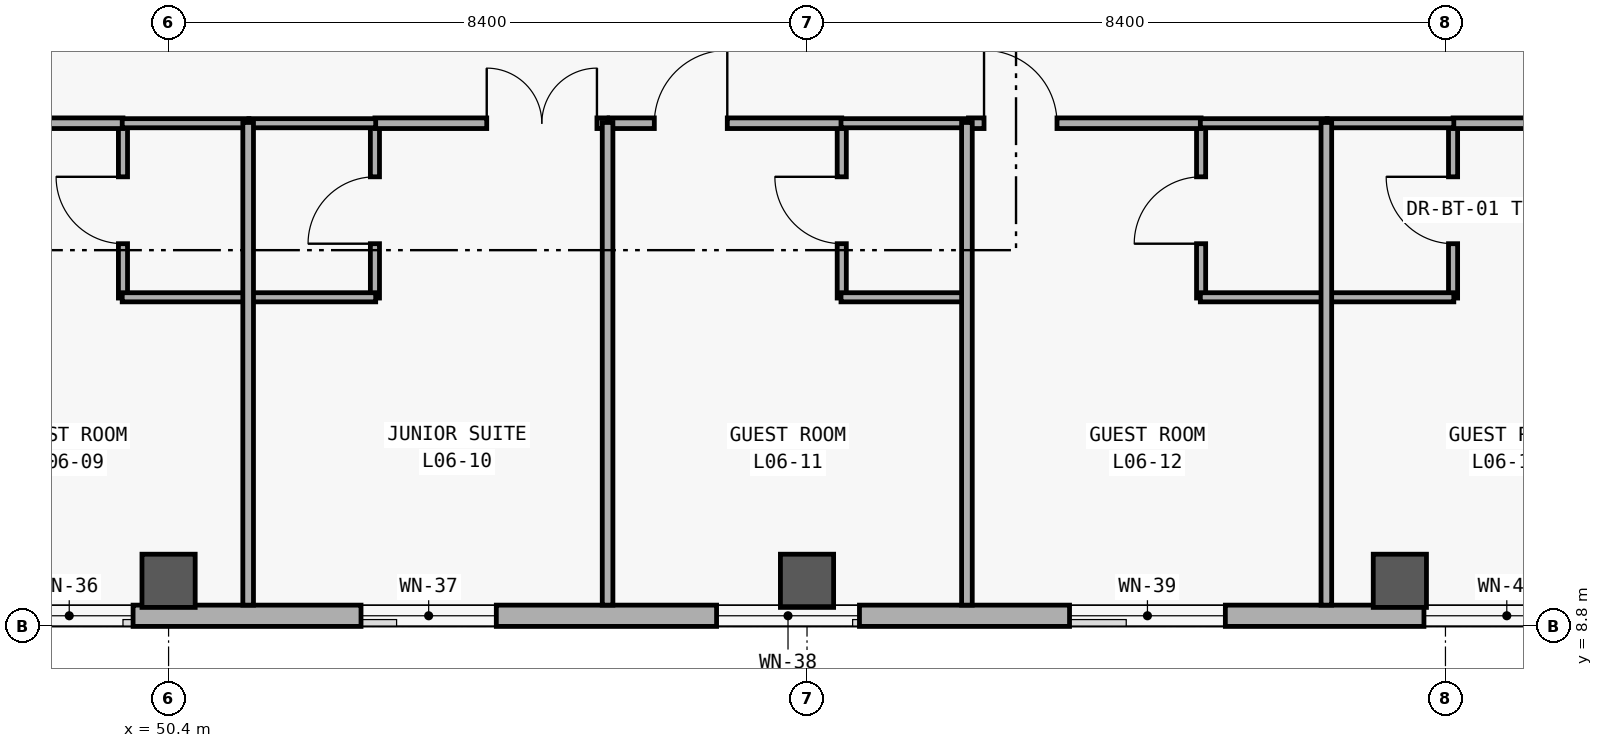
"""IFC4 building model, lengths in metres.
Left out: names, types, materials, properties, quantities, classifications, styles, units other than length and angle.
Written with IfcOpenShell. Run it as: python <this file> out.ifc"""

import sys

from ifc_helpers import new_model, si_unit, direction, frame, frame_2d, origin, origin_2d, place, context, subcontext, project, spatial, rectangle, extrude, element, fill, save


model = new_model("IFC4")
c1 = context("Model", 3, precision=1e-05, world=origin(), true_north=direction((0.0, 1.0)))
c2 = subcontext(c1, "Body", "Model", "MODEL_VIEW")
j1 = project(units=[si_unit("LENGTHUNIT", "METRE"), si_unit("PLANEANGLEUNIT", "RADIAN")], contexts=[c1])
p1 = place(None, origin())
s1 = spatial("IfcSite", under=j1, at=p1, CompositionType="ELEMENT")
p2 = place(p1, origin())
s2 = spatial("IfcBuilding", under=s1, at=p2, CompositionType="ELEMENT")
p3 = place(p2, frame((0.0, 0.0, 26.4)))
s3 = spatial("IfcBuildingStorey", under=s2, at=p3, CompositionType="ELEMENT", Elevation=26.4)
for number, where, z_axis, x_axis in (
    (1, (50.4, 9.4, 0.0), (0.0, 0.0, 1.0), (1.0, 0.0, 0.0)),
    (2, (58.8, 9.4, 0.0), (0.0, 0.0, 1.0), (1.0, 0.0, 0.0)),
    (3, (66.6, 9.4, 0.0), (0.0, 0.0, 1.0), (1.0, 0.0, 0.0)),
):
    element("IfcColumn", number, at=place(p3, frame(where, z_axis=z_axis, x_axis=x_axis)), inside=s3, PredefinedType="COLUMN", context=c2, shape_type="SweptSolid", body=[
        extrude(rectangle(XDim=0.7, YDim=0.7, at=origin_2d()), origin(), (0.0, 0.0, 1.0), 3.6),
    ])
p4 = place(p3, frame((75.32, 8.94, 0.0), z_axis=(0.0, 0.0, 1.0), x_axis=(-1.0, 0.0, 0.0)))
e4 = element("IfcWall", 4, at=p4, inside=s3, PredefinedType="SOLIDWALL", context=c2, shape_type="SweptSolid", body=[
    extrude(rectangle(XDim=66.64, YDim=0.28, at=frame_2d((33.32, 0.0))), origin(), (0.0, 0.0, 1.0), 3.32),
])
p5 = place(p4, frame((62.905, 0.0, 0.85)))
e5 = element("IfcOpeningElement", 5, at=p5, cuts=e4, PredefinedType="OPENING", context=c2, shape_type="SweptSolid", body=[
    extrude(rectangle(XDim=2.3, YDim=2.05, at=frame_2d((1.15, 1.025))), frame((0.0, 0.15, 0.0), z_axis=(0.0, -1.0, 0.0), x_axis=(1.0, 0.0, 0.0)), (0.0, 0.0, 1.0), 0.3),
])
p6 = place(p4, frame((57.952, 0.0, 0.85)))
e6 = element("IfcOpeningElement", 6, at=p6, cuts=e4, PredefinedType="OPENING", context=c2, shape_type="SweptSolid", body=[
    extrude(rectangle(XDim=2.75, YDim=2.1, at=frame_2d((1.375, 1.05))), frame((0.0, 0.15, 0.0), z_axis=(0.0, -1.0, 0.0), x_axis=(1.0, 0.0, 0.0)), (0.0, 0.0, 1.0), 0.3),
])
p7 = place(p4, frame((52.948, 0.0, 0.85)))
e7 = element("IfcOpeningElement", 7, at=p7, cuts=e4, PredefinedType="OPENING", context=c2, shape_type="SweptSolid", body=[
    extrude(rectangle(XDim=3.3, YDim=2.15, at=frame_2d((1.65, 1.075))), frame((0.0, 0.15, 0.0), z_axis=(0.0, -1.0, 0.0), x_axis=(1.0, 0.0, 0.0)), (0.0, 0.0, 1.0), 0.3),
])
p8 = place(p4, frame((49.28, 0.0, 0.85)))
e8 = element("IfcOpeningElement", 8, at=p8, cuts=e4, PredefinedType="OPENING", context=c2, shape_type="SweptSolid", body=[
    extrude(rectangle(XDim=1.18, YDim=1.5, at=frame_2d((0.59, 0.75))), frame((0.0, 0.15, 0.0), z_axis=(0.0, -1.0, 0.0), x_axis=(1.0, 0.0, 0.0)), (0.0, 0.0, 1.0), 0.3),
])
p9 = place(p4, frame((44.501, 0.0, 0.85)))
e9 = element("IfcOpeningElement", 9, at=p9, cuts=e4, PredefinedType="OPENING", context=c2, shape_type="SweptSolid", body=[
    extrude(rectangle(XDim=1.28, YDim=1.6, at=frame_2d((0.64, 0.8))), frame((0.0, 0.15, 0.0), z_axis=(0.0, -1.0, 0.0), x_axis=(1.0, 0.0, 0.0)), (0.0, 0.0, 1.0), 0.3),
])
p10 = place(p4, frame((39.723, 0.0, 0.85)))
e10 = element("IfcOpeningElement", 10, at=p10, cuts=e4, PredefinedType="OPENING", context=c2, shape_type="SweptSolid", body=[
    extrude(rectangle(XDim=1.38, YDim=1.7, at=frame_2d((0.69, 0.85))), frame((0.0, 0.15, 0.0), z_axis=(0.0, -1.0, 0.0), x_axis=(1.0, 0.0, 0.0)), (0.0, 0.0, 1.0), 0.3),
])
p11 = place(p4, frame((34.944, 0.0, 0.85)))
e11 = element("IfcOpeningElement", 11, at=p11, cuts=e4, PredefinedType="OPENING", context=c2, shape_type="SweptSolid", body=[
    extrude(rectangle(XDim=1.48, YDim=1.8, at=frame_2d((0.74, 0.9))), frame((0.0, 0.15, 0.0), z_axis=(0.0, -1.0, 0.0), x_axis=(1.0, 0.0, 0.0)), (0.0, 0.0, 1.0), 0.3),
])
p12 = place(p4, frame((30.165, 0.0, 0.85)))
e12 = element("IfcOpeningElement", 12, at=p12, cuts=e4, PredefinedType="OPENING", context=c2, shape_type="SweptSolid", body=[
    extrude(rectangle(XDim=1.58, YDim=1.85, at=frame_2d((0.79, 0.925))), frame((0.0, 0.15, 0.0), z_axis=(0.0, -1.0, 0.0), x_axis=(1.0, 0.0, 0.0)), (0.0, 0.0, 1.0), 0.3),
])
p13 = place(p4, frame((25.387, 0.0, 0.85)))
e13 = element("IfcOpeningElement", 13, at=p13, cuts=e4, PredefinedType="OPENING", context=c2, shape_type="SweptSolid", body=[
    extrude(rectangle(XDim=1.68, YDim=1.9, at=frame_2d((0.84, 0.95))), frame((0.0, 0.15, 0.0), z_axis=(0.0, -1.0, 0.0), x_axis=(1.0, 0.0, 0.0)), (0.0, 0.0, 1.0), 0.3),
])
p14 = place(p4, frame((20.608, 0.0, 0.85)))
e14 = element("IfcOpeningElement", 14, at=p14, cuts=e4, PredefinedType="OPENING", context=c2, shape_type="SweptSolid", body=[
    extrude(rectangle(XDim=1.78, YDim=1.95, at=frame_2d((0.89, 0.975))), frame((0.0, 0.15, 0.0), z_axis=(0.0, -1.0, 0.0), x_axis=(1.0, 0.0, 0.0)), (0.0, 0.0, 1.0), 0.3),
])
p15 = place(p4, frame((15.83, 0.0, 0.85)))
e15 = element("IfcOpeningElement", 15, at=p15, cuts=e4, PredefinedType="OPENING", context=c2, shape_type="SweptSolid", body=[
    extrude(rectangle(XDim=1.88, YDim=1.95, at=frame_2d((0.94, 0.975))), frame((0.0, 0.15, 0.0), z_axis=(0.0, -1.0, 0.0), x_axis=(1.0, 0.0, 0.0)), (0.0, 0.0, 1.0), 0.3),
])
p16 = place(p4, frame((11.016, 0.0, 0.85)))
e16 = element("IfcOpeningElement", 16, at=p16, cuts=e4, PredefinedType="OPENING", context=c2, shape_type="SweptSolid", body=[
    extrude(rectangle(XDim=2.05, YDim=1.95, at=frame_2d((1.025, 0.975))), frame((0.0, 0.15, 0.0), z_axis=(0.0, -1.0, 0.0), x_axis=(1.0, 0.0, 0.0)), (0.0, 0.0, 1.0), 0.3),
])
p17 = place(p4, frame((6.223, 0.0, 0.85)))
e17 = element("IfcOpeningElement", 17, at=p17, cuts=e4, PredefinedType="OPENING", context=c2, shape_type="SweptSolid", body=[
    extrude(rectangle(XDim=2.18, YDim=1.95, at=frame_2d((1.09, 0.975))), frame((0.0, 0.15, 0.0), z_axis=(0.0, -1.0, 0.0), x_axis=(1.0, 0.0, 0.0)), (0.0, 0.0, 1.0), 0.3),
])
p18 = place(p4, frame((1.394, 0.0, 0.85)))
e18 = element("IfcOpeningElement", 18, at=p18, cuts=e4, PredefinedType="OPENING", context=c2, shape_type="SweptSolid", body=[
    extrude(rectangle(XDim=2.38, YDim=1.95, at=frame_2d((1.19, 0.975))), frame((0.0, 0.15, 0.0), z_axis=(0.0, -1.0, 0.0), x_axis=(1.0, 0.0, 0.0)), (0.0, 0.0, 1.0), 0.3),
])
p19 = place(p3, frame((49.8, 13.12, 0.0), z_axis=(0.0, 0.0, 1.0), x_axis=(0.0, 1.0, 0.0)))
e19 = element("IfcWall", 19, at=p19, inside=s3, PredefinedType="PARTITIONING", context=c2, shape_type="SweptSolid", body=[
    extrude(rectangle(XDim=2.31, YDim=0.12, at=frame_2d((1.155, 0.0))), origin(), (0.0, 0.0, 1.0), 2.48),
])
p20 = place(p19, frame((0.715, 0.0, 0.0)))
e20 = element("IfcOpeningElement", 20, at=p20, cuts=e19, PredefinedType="OPENING", context=c2, shape_type="SweptSolid", body=[
    extrude(rectangle(XDim=0.88, YDim=2.15, at=frame_2d((0.44, 1.075))), frame((0.0, 0.07, 0.0), z_axis=(0.0, -1.0, 0.0), x_axis=(1.0, 0.0, 0.0)), (0.0, 0.0, 1.0), 0.14),
])
p21 = place(p3, frame((53.115, 13.12, 0.0), z_axis=(0.0, 0.0, 1.0), x_axis=(0.0, 1.0, 0.0)))
e21 = element("IfcWall", 21, at=p21, inside=s3, PredefinedType="PARTITIONING", context=c2, shape_type="SweptSolid", body=[
    extrude(rectangle(XDim=2.31, YDim=0.12, at=frame_2d((1.155, 0.0))), origin(), (0.0, 0.0, 1.0), 2.48),
])
p22 = place(p21, frame((0.715, 0.0, 0.0)))
e22 = element("IfcOpeningElement", 22, at=p22, cuts=e21, PredefinedType="OPENING", context=c2, shape_type="SweptSolid", body=[
    extrude(rectangle(XDim=0.88, YDim=2.15, at=frame_2d((0.44, 1.075))), frame((0.0, 0.07, 0.0), z_axis=(0.0, -1.0, 0.0), x_axis=(1.0, 0.0, 0.0)), (0.0, 0.0, 1.0), 0.14),
])
p23 = place(p3, frame((59.257, 13.12, 0.0), z_axis=(0.0, 0.0, 1.0), x_axis=(0.0, 1.0, 0.0)))
e23 = element("IfcWall", 23, at=p23, inside=s3, PredefinedType="PARTITIONING", context=c2, shape_type="SweptSolid", body=[
    extrude(rectangle(XDim=2.31, YDim=0.12, at=frame_2d((1.155, 0.0))), origin(), (0.0, 0.0, 1.0), 2.48),
])
p24 = place(p23, frame((0.715, 0.0, 0.0)))
e24 = element("IfcOpeningElement", 24, at=p24, cuts=e23, PredefinedType="OPENING", context=c2, shape_type="SweptSolid", body=[
    extrude(rectangle(XDim=0.88, YDim=2.15, at=frame_2d((0.44, 1.075))), frame((0.0, 0.07, 0.0), z_axis=(0.0, -1.0, 0.0), x_axis=(1.0, 0.0, 0.0)), (0.0, 0.0, 1.0), 0.14),
])
p25 = place(p3, frame((63.985, 13.12, 0.0), z_axis=(0.0, 0.0, 1.0), x_axis=(0.0, 1.0, 0.0)))
e25 = element("IfcWall", 25, at=p25, inside=s3, PredefinedType="PARTITIONING", context=c2, shape_type="SweptSolid", body=[
    extrude(rectangle(XDim=2.31, YDim=0.12, at=frame_2d((1.155, 0.0))), origin(), (0.0, 0.0, 1.0), 2.48),
])
p26 = place(p25, frame((0.715, 0.0, 0.0)))
e26 = element("IfcOpeningElement", 26, at=p26, cuts=e25, PredefinedType="OPENING", context=c2, shape_type="SweptSolid", body=[
    extrude(rectangle(XDim=0.88, YDim=2.15, at=frame_2d((0.44, 1.075))), frame((0.0, 0.07, 0.0), z_axis=(0.0, -1.0, 0.0), x_axis=(1.0, 0.0, 0.0)), (0.0, 0.0, 1.0), 0.14),
])
p27 = place(p3, frame((67.3, 13.12, 0.0), z_axis=(0.0, 0.0, 1.0), x_axis=(0.0, 1.0, 0.0)))
e27 = element("IfcWall", 27, at=p27, inside=s3, PredefinedType="PARTITIONING", context=c2, shape_type="SweptSolid", body=[
    extrude(rectangle(XDim=2.31, YDim=0.12, at=frame_2d((1.155, 0.0))), origin(), (0.0, 0.0, 1.0), 2.48),
])
p28 = place(p27, frame((0.715, 0.0, 0.0)))
e28 = element("IfcOpeningElement", 28, at=p28, cuts=e27, PredefinedType="OPENING", context=c2, shape_type="SweptSolid", body=[
    extrude(rectangle(XDim=0.88, YDim=2.15, at=frame_2d((0.44, 1.075))), frame((0.0, 0.07, 0.0), z_axis=(0.0, -1.0, 0.0), x_axis=(1.0, 0.0, 0.0)), (0.0, 0.0, 1.0), 0.14),
])
p29 = place(p3, frame((46.739, 15.42, 0.0), z_axis=(0.0, 0.0, 1.0), x_axis=(1.0, 0.0, 0.0)))
e29 = element("IfcWall", 29, at=p29, inside=s3, PredefinedType="PARTITIONING", context=c2, shape_type="SweptSolid", body=[
    extrude(rectangle(XDim=3.061, YDim=0.14, at=frame_2d((1.531, 0.0))), origin(), (0.0, 0.0, 1.0), 2.48),
])
p30 = place(p29, frame((0.92, 0.0, 0.0)))
e30 = element("IfcOpeningElement", 30, at=p30, cuts=e29, PredefinedType="OPENING", context=c2, shape_type="SweptSolid", body=[
    extrude(rectangle(XDim=0.96, YDim=2.25, at=frame_2d((0.48, 1.125))), frame((0.0, 0.08, 0.0), z_axis=(0.0, -1.0, 0.0), x_axis=(1.0, 0.0, 0.0)), (0.0, 0.0, 1.0), 0.16),
])
p31 = place(p3, frame((53.115, 15.42, 0.0), z_axis=(0.0, 0.0, 1.0), x_axis=(1.0, 0.0, 0.0)))
e31 = element("IfcWall", 31, at=p31, inside=s3, PredefinedType="PARTITIONING", context=c2, shape_type="SweptSolid", body=[
    extrude(rectangle(XDim=3.061, YDim=0.14, at=frame_2d((1.531, 0.0))), origin(), (0.0, 0.0, 1.0), 2.48),
])
p32 = place(p31, frame((1.471, 0.0, 0.0)))
e32 = element("IfcOpeningElement", 32, at=p32, cuts=e31, PredefinedType="OPENING", context=c2, shape_type="SweptSolid", body=[
    extrude(rectangle(XDim=1.45, YDim=2.3, at=frame_2d((0.725, 1.15))), frame((0.0, 0.08, 0.0), z_axis=(0.0, -1.0, 0.0), x_axis=(1.0, 0.0, 0.0)), (0.0, 0.0, 1.0), 0.16),
])
p33 = place(p3, frame((56.196, 15.42, 0.0), z_axis=(0.0, 0.0, 1.0), x_axis=(1.0, 0.0, 0.0)))
e33 = element("IfcWall", 33, at=p33, inside=s3, PredefinedType="PARTITIONING", context=c2, shape_type="SweptSolid", body=[
    extrude(rectangle(XDim=3.061, YDim=0.14, at=frame_2d((1.531, 0.0))), origin(), (0.0, 0.0, 1.0), 2.48),
])
p34 = place(p33, frame((0.595, 0.0, 0.0)))
e34 = element("IfcOpeningElement", 34, at=p34, cuts=e33, PredefinedType="OPENING", context=c2, shape_type="SweptSolid", body=[
    extrude(rectangle(XDim=0.96, YDim=2.25, at=frame_2d((0.48, 1.125))), frame((0.0, 0.08, 0.0), z_axis=(0.0, -1.0, 0.0), x_axis=(1.0, 0.0, 0.0)), (0.0, 0.0, 1.0), 0.16),
])
p35 = place(p3, frame((60.924, 15.42, 0.0), z_axis=(0.0, 0.0, 1.0), x_axis=(1.0, 0.0, 0.0)))
e35 = element("IfcWall", 35, at=p35, inside=s3, PredefinedType="PARTITIONING", context=c2, shape_type="SweptSolid", body=[
    extrude(rectangle(XDim=3.061, YDim=0.14, at=frame_2d((1.531, 0.0))), origin(), (0.0, 0.0, 1.0), 2.48),
])
p36 = place(p35, frame((0.205, 0.0, 0.0)))
e36 = element("IfcOpeningElement", 36, at=p36, cuts=e35, PredefinedType="OPENING", context=c2, shape_type="SweptSolid", body=[
    extrude(rectangle(XDim=0.96, YDim=2.25, at=frame_2d((0.48, 1.125))), frame((0.0, 0.08, 0.0), z_axis=(0.0, -1.0, 0.0), x_axis=(1.0, 0.0, 0.0)), (0.0, 0.0, 1.0), 0.16),
])
p37 = place(p3, frame((67.3, 15.42, 0.0), z_axis=(0.0, 0.0, 1.0), x_axis=(1.0, 0.0, 0.0)))
e37 = element("IfcWall", 37, at=p37, inside=s3, PredefinedType="PARTITIONING", context=c2, shape_type="SweptSolid", body=[
    extrude(rectangle(XDim=3.061, YDim=0.14, at=frame_2d((1.531, 0.0))), origin(), (0.0, 0.0, 1.0), 2.48),
])
p38 = place(p37, frame((1.896, 0.0, 0.0)))
e38 = element("IfcOpeningElement", 38, at=p38, cuts=e37, PredefinedType="OPENING", context=c2, shape_type="SweptSolid", body=[
    extrude(rectangle(XDim=0.96, YDim=2.25, at=frame_2d((0.48, 1.125))), frame((0.0, 0.08, 0.0), z_axis=(0.0, -1.0, 0.0), x_axis=(1.0, 0.0, 0.0)), (0.0, 0.0, 1.0), 0.16),
])
for number, where, z_axis, x_axis in (
    (39, (49.79, 13.13, 0.0), (0.0, 0.0, 1.0), (1.0, 0.0, 0.0)),
    (40, (49.79, 15.42, 0.0), (0.0, 0.0, 1.0), (1.0, 0.0, 0.0)),
):
    element("IfcWall", number, at=place(p3, frame(where, z_axis=z_axis, x_axis=x_axis)), inside=s3, PredefinedType="PARTITIONING", context=c2, shape_type="SweptSolid", body=[
        extrude(rectangle(XDim=1.667, YDim=0.12, at=frame_2d((0.833, 0.0))), origin(), (0.0, 0.0, 1.0), 2.48),
    ])
for number, where, z_axis, x_axis in (
    (41, (51.457, 13.13, 0.0), (0.0, 0.0, 1.0), (1.0, 0.0, 0.0)),
    (42, (51.457, 15.42, 0.0), (0.0, 0.0, 1.0), (1.0, 0.0, 0.0)),
):
    element("IfcWall", number, at=place(p3, frame(where, z_axis=z_axis, x_axis=x_axis)), inside=s3, PredefinedType="PARTITIONING", context=c2, shape_type="SweptSolid", body=[
        extrude(rectangle(XDim=1.668, YDim=0.12, at=frame_2d((0.834, 0.0))), origin(), (0.0, 0.0, 1.0), 2.48),
    ])
for number, where, z_axis, x_axis in (
    (43, (59.247, 13.13, 0.0), (0.0, 0.0, 1.0), (1.0, 0.0, 0.0)),
    (44, (59.247, 15.42, 0.0), (0.0, 0.0, 1.0), (1.0, 0.0, 0.0)),
):
    element("IfcWall", number, at=place(p3, frame(where, z_axis=z_axis, x_axis=x_axis)), inside=s3, PredefinedType="PARTITIONING", context=c2, shape_type="SweptSolid", body=[
        extrude(rectangle(XDim=1.667, YDim=0.12, at=frame_2d((0.833, 0.0))), origin(), (0.0, 0.0, 1.0), 2.48),
    ])
for number, where, z_axis, x_axis in (
    (45, (63.975, 13.13, 0.0), (0.0, 0.0, 1.0), (1.0, 0.0, 0.0)),
    (46, (63.975, 15.42, 0.0), (0.0, 0.0, 1.0), (1.0, 0.0, 0.0)),
):
    element("IfcWall", number, at=place(p3, frame(where, z_axis=z_axis, x_axis=x_axis)), inside=s3, PredefinedType="PARTITIONING", context=c2, shape_type="SweptSolid", body=[
        extrude(rectangle(XDim=1.668, YDim=0.12, at=frame_2d((0.834, 0.0))), origin(), (0.0, 0.0, 1.0), 2.48),
    ])
for number, where, z_axis, x_axis in (
    (47, (65.643, 13.13, 0.0), (0.0, 0.0, 1.0), (1.0, 0.0, 0.0)),
    (48, (65.643, 15.42, 0.0), (0.0, 0.0, 1.0), (1.0, 0.0, 0.0)),
):
    element("IfcWall", number, at=place(p3, frame(where, z_axis=z_axis, x_axis=x_axis)), inside=s3, PredefinedType="PARTITIONING", context=c2, shape_type="SweptSolid", body=[
        extrude(rectangle(XDim=1.667, YDim=0.12, at=frame_2d((0.833, 0.0))), origin(), (0.0, 0.0, 1.0), 2.48),
    ])
for number, where, z_axis, x_axis in (
    (49, (51.447, 9.08, 0.0), (0.0, 0.0, 1.0), (0.0, 1.0, 0.0)),
    (50, (56.176, 9.08, 0.0), (0.0, 0.0, 1.0), (0.0, 1.0, 0.0)),
    (51, (60.904, 9.08, 0.0), (0.0, 0.0, 1.0), (0.0, 1.0, 0.0)),
    (52, (65.633, 9.08, 0.0), (0.0, 0.0, 1.0), (0.0, 1.0, 0.0)),
):
    element("IfcWall", number, at=place(p3, frame(where, z_axis=z_axis, x_axis=x_axis)), inside=s3, PredefinedType="PARTITIONING", context=c2, shape_type="SweptSolid", body=[
        extrude(rectangle(XDim=6.35, YDim=0.14, at=frame_2d((3.175, 0.0))), origin(), (0.0, 0.0, 1.0), 2.48),
    ])
p39 = place(p13, origin())
e53 = element("IfcWindow", 53, at=p39, inside=s3, PartitioningType="SINGLE_PANEL", PredefinedType="WINDOW", context=c2, shape_type="SweptSolid", body=[
    extrude(rectangle(XDim=1.68, YDim=1.9, at=frame_2d((0.84, 0.95))), frame((0.0, 0.03, 0.0), z_axis=(0.0, -1.0, 0.0), x_axis=(1.0, 0.0, 0.0)), (0.0, 0.0, 1.0), 0.06),
])
fill(e13, e53)
p40 = place(p14, origin())
e54 = element("IfcWindow", 54, at=p40, inside=s3, PartitioningType="SINGLE_PANEL", PredefinedType="WINDOW", context=c2, shape_type="SweptSolid", body=[
    extrude(rectangle(XDim=1.78, YDim=1.95, at=frame_2d((0.89, 0.975))), frame((0.0, 0.03, 0.0), z_axis=(0.0, -1.0, 0.0), x_axis=(1.0, 0.0, 0.0)), (0.0, 0.0, 1.0), 0.06),
])
fill(e14, e54)
p41 = place(p15, origin())
e55 = element("IfcWindow", 55, at=p41, inside=s3, PartitioningType="SINGLE_PANEL", PredefinedType="WINDOW", context=c2, shape_type="SweptSolid", body=[
    extrude(rectangle(XDim=1.88, YDim=1.95, at=frame_2d((0.94, 0.975))), frame((0.0, 0.03, 0.0), z_axis=(0.0, -1.0, 0.0), x_axis=(1.0, 0.0, 0.0)), (0.0, 0.0, 1.0), 0.06),
])
fill(e15, e55)
p42 = place(p16, origin())
e56 = element("IfcWindow", 56, at=p42, inside=s3, PartitioningType="SINGLE_PANEL", PredefinedType="WINDOW", context=c2, shape_type="SweptSolid", body=[
    extrude(rectangle(XDim=2.05, YDim=1.95, at=frame_2d((1.025, 0.975))), frame((0.0, 0.03, 0.0), z_axis=(0.0, -1.0, 0.0), x_axis=(1.0, 0.0, 0.0)), (0.0, 0.0, 1.0), 0.06),
])
fill(e16, e56)
p43 = place(p17, origin())
e57 = element("IfcWindow", 57, at=p43, inside=s3, PartitioningType="SINGLE_PANEL", PredefinedType="WINDOW", context=c2, shape_type="SweptSolid", body=[
    extrude(rectangle(XDim=2.18, YDim=1.95, at=frame_2d((1.09, 0.975))), frame((0.0, 0.03, 0.0), z_axis=(0.0, -1.0, 0.0), x_axis=(1.0, 0.0, 0.0)), (0.0, 0.0, 1.0), 0.06),
])
fill(e17, e57)
p44 = place(p20, origin())
e58 = element("IfcDoor", 58, at=p44, inside=s3, OperationType="SINGLE_SWING_RIGHT", PredefinedType="DOOR", context=c2, shape_type="SweptSolid", body=[
    extrude(rectangle(XDim=0.88, YDim=2.15, at=frame_2d((0.44, 1.075))), frame((0.0, 0.025, 0.0), z_axis=(0.0, -1.0, 0.0), x_axis=(1.0, 0.0, 0.0)), (0.0, 0.0, 1.0), 0.05),
])
fill(e20, e58)
p45 = place(p22, origin())
e59 = element("IfcDoor", 59, at=p45, inside=s3, OperationType="SINGLE_SWING_LEFT", PredefinedType="DOOR", context=c2, shape_type="SweptSolid", body=[
    extrude(rectangle(XDim=0.88, YDim=2.15, at=frame_2d((0.44, 1.075))), frame((0.0, 0.025, 0.0), z_axis=(0.0, -1.0, 0.0), x_axis=(1.0, 0.0, 0.0)), (0.0, 0.0, 1.0), 0.05),
])
fill(e22, e59)
p46 = place(p24, origin())
e60 = element("IfcDoor", 60, at=p46, inside=s3, OperationType="SINGLE_SWING_RIGHT", PredefinedType="DOOR", context=c2, shape_type="SweptSolid", body=[
    extrude(rectangle(XDim=0.88, YDim=2.15, at=frame_2d((0.44, 1.075))), frame((0.0, 0.025, 0.0), z_axis=(0.0, -1.0, 0.0), x_axis=(1.0, 0.0, 0.0)), (0.0, 0.0, 1.0), 0.05),
])
fill(e24, e60)
p47 = place(p26, origin())
e61 = element("IfcDoor", 61, at=p47, inside=s3, OperationType="SINGLE_SWING_LEFT", PredefinedType="DOOR", context=c2, shape_type="SweptSolid", body=[
    extrude(rectangle(XDim=0.88, YDim=2.15, at=frame_2d((0.44, 1.075))), frame((0.0, 0.025, 0.0), z_axis=(0.0, -1.0, 0.0), x_axis=(1.0, 0.0, 0.0)), (0.0, 0.0, 1.0), 0.05),
])
fill(e26, e61)
p48 = place(p28, origin())
e62 = element("IfcDoor", 62, at=p48, inside=s3, OperationType="SINGLE_SWING_RIGHT", PredefinedType="DOOR", context=c2, shape_type="SweptSolid", body=[
    extrude(rectangle(XDim=0.88, YDim=2.15, at=frame_2d((0.44, 1.075))), frame((0.0, 0.025, 0.0), z_axis=(0.0, -1.0, 0.0), x_axis=(1.0, 0.0, 0.0)), (0.0, 0.0, 1.0), 0.05),
])
fill(e28, e62)
p49 = place(p32, origin())
e63 = element("IfcDoor", 63, at=p49, inside=s3, OperationType="DOUBLE_DOOR_SINGLE_SWING", PredefinedType="DOOR", context=c2, shape_type="SweptSolid", body=[
    extrude(rectangle(XDim=1.45, YDim=2.3, at=frame_2d((0.725, 1.15))), frame((0.0, 0.025, 0.0), z_axis=(0.0, -1.0, 0.0), x_axis=(1.0, 0.0, 0.0)), (0.0, 0.0, 1.0), 0.05),
])
fill(e32, e63)
p50 = place(p34, origin())
e64 = element("IfcDoor", 64, at=p50, inside=s3, OperationType="SINGLE_SWING_RIGHT", PredefinedType="DOOR", context=c2, shape_type="SweptSolid", body=[
    extrude(rectangle(XDim=0.96, YDim=2.25, at=frame_2d((0.48, 1.125))), frame((0.0, 0.025, 0.0), z_axis=(0.0, -1.0, 0.0), x_axis=(1.0, 0.0, 0.0)), (0.0, 0.0, 1.0), 0.05),
])
fill(e34, e64)
p51 = place(p36, origin())
e65 = element("IfcDoor", 65, at=p51, inside=s3, OperationType="SINGLE_SWING_LEFT", PredefinedType="DOOR", context=c2, shape_type="SweptSolid", body=[
    extrude(rectangle(XDim=0.96, YDim=2.25, at=frame_2d((0.48, 1.125))), frame((0.0, 0.025, 0.0), z_axis=(0.0, -1.0, 0.0), x_axis=(1.0, 0.0, 0.0)), (0.0, 0.0, 1.0), 0.05),
])
fill(e36, e65)
save(model, sys.argv[1])
